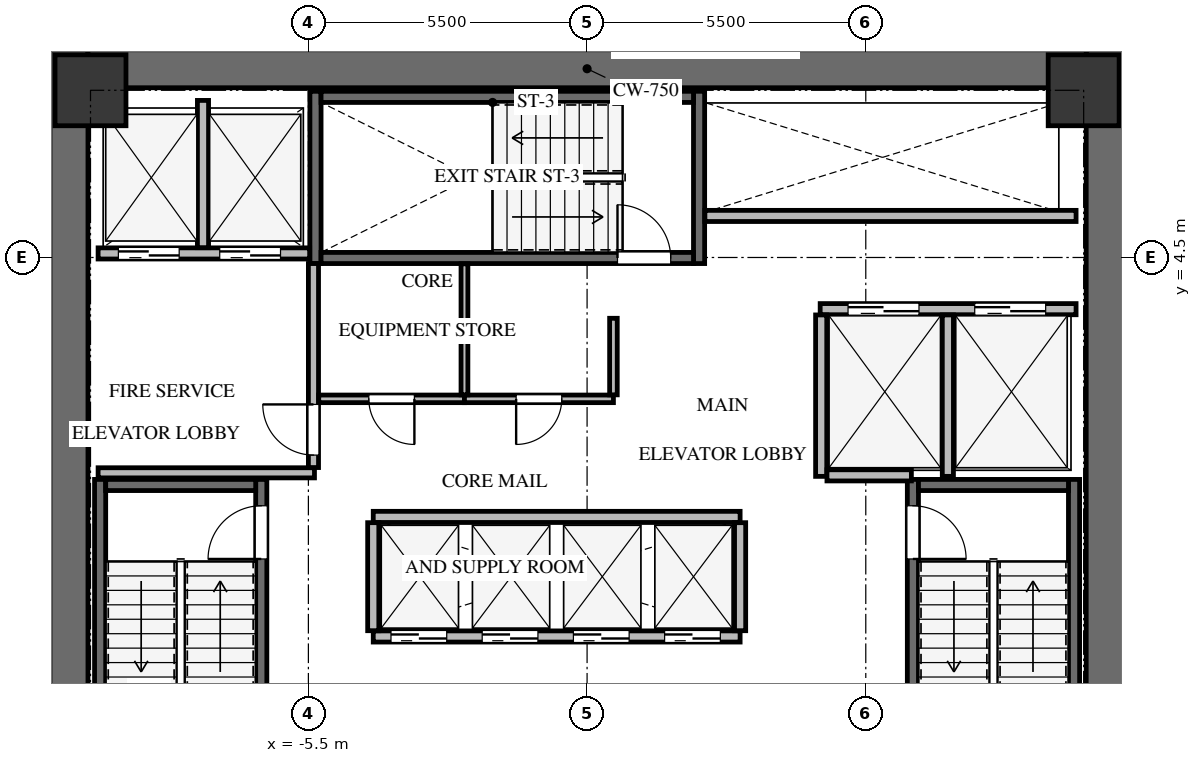
"""IFC4 building model, lengths in metres.
Left out: names, types, materials, properties, quantities, classifications, styles, units other than length and angle.
Written with IfcOpenShell. Run it as: python <this file> out.ifc"""

import sys

from ifc_helpers import new_model, si_unit, direction, frame, frame_2d, origin, origin_2d, place, context, subcontext, project, spatial, rectangle, extrude, source, transform, mapped, element, fill, save


model = new_model("IFC4")
c1 = context("Model", 3, precision=1e-05, world=origin(), true_north=direction((0.0, 1.0)))
c2 = subcontext(c1, "Body", "Model", "MODEL_VIEW")
j1 = project(units=[si_unit("LENGTHUNIT", "METRE"), si_unit("PLANEANGLEUNIT", "RADIAN")], contexts=[c1])
p1 = place(None, origin())
s1 = spatial("IfcSite", under=j1, at=p1, CompositionType="ELEMENT")
p2 = place(p1, origin())
s2 = spatial("IfcBuilding", under=s1, at=p2, CompositionType="ELEMENT")
p3 = place(p2, frame((0.0, 0.0, 104.1)))
s3 = spatial("IfcBuildingStorey", under=s2, at=p3, CompositionType="ELEMENT", Elevation=104.1)
for number, where, z_axis, x_axis in (
    (1, (-10.225, -8.6, 0.0), (0.0, 0.0, 1.0), (0.0, 1.0, 0.0)),
    (2, (10.225, -8.6, 0.0), (0.0, 0.0, 1.0), (0.0, 1.0, 0.0)),
):
    element("IfcWall", number, at=place(p3, frame(where, z_axis=z_axis, x_axis=x_axis)), inside=s3, PredefinedType="SHEAR", context=c2, shape_type="SweptSolid", body=[
        extrude(rectangle(XDim=17.2, YDim=0.75, at=frame_2d((8.6, 0.0))), origin(), (0.0, 0.0, 1.0), 3.3),
    ])
p4 = place(p3, frame((-9.85, 8.225, 0.0), z_axis=(0.0, 0.0, 1.0), x_axis=(1.0, 0.0, 0.0)))
e3 = element("IfcWall", 3, at=p4, inside=s3, PredefinedType="SHEAR", context=c2, shape_type="SweptSolid", body=[
    extrude(rectangle(XDim=19.7, YDim=0.75, at=frame_2d((9.85, 0.0))), origin(), (0.0, 0.0, 1.0), 3.3),
])
p5 = place(p3, frame((-6.43, -7.77, -0.24), z_axis=(0.0, 0.0, 1.0), x_axis=(0.0, 1.0, 0.0)))
e4 = element("IfcWall", 4, at=p5, inside=s3, PredefinedType="SHEAR", context=c2, shape_type="SweptSolid", body=[
    extrude(rectangle(XDim=7.89, YDim=0.22, at=frame_2d((3.945, 0.0))), origin(), (0.0, 0.0, 1.0), 3.3),
])
p6 = place(p5, frame((6.32, 0.0, 0.0)))
e5 = element("IfcOpeningElement", 5, at=p6, cuts=e4, PredefinedType="OPENING", context=c2, shape_type="SweptSolid", body=[
    extrude(rectangle(XDim=1.05, YDim=2.15, at=frame_2d((0.525, 1.075))), frame((0.0, 0.12, 0.0), z_axis=(0.0, -1.0, 0.0), x_axis=(1.0, 0.0, 0.0)), (0.0, 0.0, 1.0), 0.24),
])
p7 = place(p3, frame((-9.61, 0.12, -0.24), z_axis=(0.0, 0.0, 1.0), x_axis=(0.0, -1.0, 0.0)))
e6 = element("IfcWall", 6, at=p7, inside=s3, PredefinedType="SHEAR", context=c2, shape_type="SweptSolid", body=[
    extrude(rectangle(XDim=7.89, YDim=0.22, at=frame_2d((3.945, 0.0))), origin(), (0.0, 0.0, 1.0), 3.3),
])
p8 = place(p3, frame((-6.54, 0.01, -0.24), z_axis=(0.0, 0.0, 1.0), x_axis=(-1.0, 0.0, 0.0)))
e7 = element("IfcWall", 7, at=p8, inside=s3, PredefinedType="SHEAR", context=c2, shape_type="SweptSolid", body=[
    extrude(rectangle(XDim=2.96, YDim=0.22, at=frame_2d((1.48, 0.0))), origin(), (0.0, 0.0, 1.0), 3.3),
])
p9 = place(p3, frame((9.61, -7.77, -0.24), z_axis=(0.0, 0.0, 1.0), x_axis=(0.0, 1.0, 0.0)))
e8 = element("IfcWall", 8, at=p9, inside=s3, PredefinedType="SHEAR", context=c2, shape_type="SweptSolid", body=[
    extrude(rectangle(XDim=7.89, YDim=0.22, at=frame_2d((3.945, 0.0))), origin(), (0.0, 0.0, 1.0), 3.3),
])
p10 = place(p3, frame((6.43, 0.12, -0.24), z_axis=(0.0, 0.0, 1.0), x_axis=(0.0, -1.0, 0.0)))
e9 = element("IfcWall", 9, at=p10, inside=s3, PredefinedType="SHEAR", context=c2, shape_type="SweptSolid", body=[
    extrude(rectangle(XDim=7.89, YDim=0.22, at=frame_2d((3.945, 0.0))), origin(), (0.0, 0.0, 1.0), 3.3),
])
p11 = place(p10, frame((0.52, 0.0, 0.0)))
e10 = element("IfcOpeningElement", 10, at=p11, cuts=e9, PredefinedType="OPENING", context=c2, shape_type="SweptSolid", body=[
    extrude(rectangle(XDim=1.05, YDim=2.15, at=frame_2d((0.525, 1.075))), frame((0.0, 0.12, 0.0), z_axis=(0.0, -1.0, 0.0), x_axis=(1.0, 0.0, 0.0)), (0.0, 0.0, 1.0), 0.24),
])
p12 = place(p3, frame((9.5, 0.01, -0.24), z_axis=(0.0, 0.0, 1.0), x_axis=(-1.0, 0.0, 0.0)))
e11 = element("IfcWall", 11, at=p12, inside=s3, PredefinedType="SHEAR", context=c2, shape_type="SweptSolid", body=[
    extrude(rectangle(XDim=2.96, YDim=0.22, at=frame_2d((1.48, 0.0))), origin(), (0.0, 0.0, 1.0), 3.3),
])
for number, where, z_axis, x_axis in (
    (12, (2.21, 4.38, -0.24), (0.0, 0.0, 1.0), (0.0, 1.0, 0.0)),
    (13, (-5.36, 7.78, -0.24), (0.0, 0.0, 1.0), (0.0, -1.0, 0.0)),
):
    element("IfcWall", number, at=place(p3, frame(where, z_axis=z_axis, x_axis=x_axis)), inside=s3, PredefinedType="SHEAR", context=c2, shape_type="SweptSolid", body=[
        extrude(rectangle(XDim=3.4, YDim=0.22, at=frame_2d((1.7, 0.0))), origin(), (0.0, 0.0, 1.0), 3.3),
    ])
p13 = place(p3, frame((-5.25, 4.49, -0.24), z_axis=(0.0, 0.0, 1.0), x_axis=(1.0, 0.0, 0.0)))
e14 = element("IfcWall", 14, at=p13, inside=s3, PredefinedType="SHEAR", context=c2, shape_type="SweptSolid", body=[
    extrude(rectangle(XDim=7.35, YDim=0.22, at=frame_2d((3.675, 0.0))), origin(), (0.0, 0.0, 1.0), 3.3),
])
p14 = place(p13, frame((5.85, 0.0, 0.0)))
e15 = element("IfcOpeningElement", 15, at=p14, cuts=e14, PredefinedType="OPENING", context=c2, shape_type="SweptSolid", body=[
    extrude(rectangle(XDim=1.05, YDim=2.15, at=frame_2d((0.525, 1.075))), frame((0.0, 0.12, 0.0), z_axis=(0.0, -1.0, 0.0), x_axis=(1.0, 0.0, 0.0)), (0.0, 0.0, 1.0), 0.24),
])
p15 = place(p3, frame((2.1, 7.67, -0.24), z_axis=(0.0, 0.0, 1.0), x_axis=(-1.0, 0.0, 0.0)))
e16 = element("IfcWall", 16, at=p15, inside=s3, PredefinedType="SHEAR", context=c2, shape_type="SweptSolid", body=[
    extrude(rectangle(XDim=7.35, YDim=0.22, at=frame_2d((3.675, 0.0))), origin(), (0.0, 0.0, 1.0), 3.3),
])
m1 = source(origin(), c2, "Body", "SweptSolid", [
    extrude(rectangle(XDim=1.4, YDim=1.4, at=origin_2d()), origin(), (0.0, 0.0, 1.0), 3.3),
])
for number, where, z_axis, x_axis in (
    (17, (9.8, 7.8, -0.24), (0.0, 0.0, 1.0), (1.0, 0.0, 0.0)),
    (18, (-9.8, 7.8, -0.24), (0.0, 0.0, 1.0), (1.0, 0.0, 0.0)),
):
    element("IfcColumn", number, at=place(p3, frame(where, z_axis=z_axis, x_axis=x_axis)), inside=s3, PredefinedType="COLUMN", context=c2, shape_type="MappedRepresentation", body=[
        mapped(m1, transform((0.0, 0.0, 0.0), x_axis=(1.0, 0.0, 0.0), y_axis=(0.0, 1.0, 0.0), z_axis=(0.0, 0.0, 1.0), scale=1.0)),
    ])
p16 = place(p3, frame((-9.65, 4.58, 0.0), z_axis=(0.0, 0.0, 1.0), x_axis=(1.0, 0.0, 0.0)))
e19 = element("IfcWall", 19, at=p16, inside=s3, PredefinedType="SOLIDWALL", context=c2, shape_type="SweptSolid", body=[
    extrude(rectangle(XDim=4.175, YDim=0.22, at=frame_2d((2.087, 0.0))), origin(), (0.0, 0.0, 1.0), 3.045),
])
p17 = place(p16, frame((0.4, 0.0, 0.0)))
e20 = element("IfcOpeningElement", 20, at=p17, cuts=e19, PredefinedType="OPENING", context=c2, shape_type="SweptSolid", body=[
    extrude(rectangle(XDim=1.2, YDim=2.15, at=frame_2d((0.6, 1.075))), frame((0.0, 0.12, 0.0), z_axis=(0.0, -1.0, 0.0), x_axis=(1.0, 0.0, 0.0)), (0.0, 0.0, 1.0), 0.24),
])
p18 = place(p16, frame((2.4, 0.0, 0.0)))
e21 = element("IfcOpeningElement", 21, at=p18, cuts=e19, PredefinedType="OPENING", context=c2, shape_type="SweptSolid", body=[
    extrude(rectangle(XDim=1.2, YDim=2.15, at=frame_2d((0.6, 1.075))), frame((0.0, 0.12, 0.0), z_axis=(0.0, -1.0, 0.0), x_axis=(1.0, 0.0, 0.0)), (0.0, 0.0, 1.0), 0.24),
])
p19 = place(p3, frame((-7.58, 4.694, 0.0), z_axis=(0.0, 0.0, 1.0), x_axis=(0.0, 1.0, 0.0)))
e22 = element("IfcWall", 22, at=p19, inside=s3, PredefinedType="SOLIDWALL", context=c2, shape_type="SweptSolid", body=[
    extrude(rectangle(XDim=2.906, YDim=0.22, at=frame_2d((1.453, 0.0))), origin(), (0.0, 0.0, 1.0), 3.045),
])
p20 = place(p3, frame((-9.65, 0.25, 0.0), z_axis=(0.0, 0.0, 1.0), x_axis=(1.0, 0.0, 0.0)))
e23 = element("IfcWall", 23, at=p20, inside=s3, PredefinedType="SOLIDWALL", context=c2, shape_type="SweptSolid", body=[
    extrude(rectangle(XDim=4.27, YDim=0.2, at=frame_2d((2.135, 0.0))), origin(), (0.0, 0.0, 1.0), 3.045),
])
p21 = place(p3, frame((-5.4, 0.354, 0.0), z_axis=(0.0, 0.0, 1.0), x_axis=(0.0, 1.0, 0.0)))
e24 = element("IfcWall", 24, at=p21, inside=s3, PredefinedType="SOLIDWALL", context=c2, shape_type="SweptSolid", body=[
    extrude(rectangle(XDim=4.026, YDim=0.2, at=frame_2d((2.013, 0.0))), origin(), (0.0, 0.0, 1.0), 3.045),
])
p22 = place(p21, frame((0.246, 0.0, 0.0)))
e25 = element("IfcOpeningElement", 25, at=p22, cuts=e24, PredefinedType="OPENING", context=c2, shape_type="SweptSolid", body=[
    extrude(rectangle(XDim=1.0, YDim=2.15, at=frame_2d((0.5, 1.075))), frame((0.0, 0.11, 0.0), z_axis=(0.0, -1.0, 0.0), x_axis=(1.0, 0.0, 0.0)), (0.0, 0.0, 1.0), 0.22),
])
p23 = place(p3, frame((4.6, 3.48, 0.0), z_axis=(0.0, 0.0, 1.0), x_axis=(1.0, 0.0, 0.0)))
e26 = element("IfcWall", 26, at=p23, inside=s3, PredefinedType="SOLIDWALL", context=c2, shape_type="SweptSolid", body=[
    extrude(rectangle(XDim=5.05, YDim=0.22, at=frame_2d((2.525, 0.0))), origin(), (0.0, 0.0, 1.0), 3.045),
])
p24 = place(p23, frame((0.55, 0.0, 0.0)))
e27 = element("IfcOpeningElement", 27, at=p24, cuts=e26, PredefinedType="OPENING", context=c2, shape_type="SweptSolid", body=[
    extrude(rectangle(XDim=1.4, YDim=2.15, at=frame_2d((0.7, 1.075))), frame((0.0, 0.12, 0.0), z_axis=(0.0, -1.0, 0.0), x_axis=(1.0, 0.0, 0.0)), (0.0, 0.0, 1.0), 0.24),
])
p25 = place(p23, frame((3.05, 0.0, 0.0)))
e28 = element("IfcOpeningElement", 28, at=p25, cuts=e26, PredefinedType="OPENING", context=c2, shape_type="SweptSolid", body=[
    extrude(rectangle(XDim=1.4, YDim=2.15, at=frame_2d((0.7, 1.075))), frame((0.0, 0.12, 0.0), z_axis=(0.0, -1.0, 0.0), x_axis=(1.0, 0.0, 0.0)), (0.0, 0.0, 1.0), 0.24),
])
for number, where, z_axis, x_axis in (
    (29, (4.62, 0.18, 0.0), (0.0, 0.0, 1.0), (0.0, 1.0, 0.0)),
    (30, (7.12, 0.18, 0.0), (0.0, 0.0, 1.0), (0.0, 1.0, 0.0)),
):
    element("IfcWall", number, at=place(p3, frame(where, z_axis=z_axis, x_axis=x_axis)), inside=s3, PredefinedType="SOLIDWALL", context=c2, shape_type="SweptSolid", body=[
        extrude(rectangle(XDim=3.186, YDim=0.22, at=frame_2d((1.593, 0.0))), origin(), (0.0, 0.0, 1.0), 3.045),
    ])
p26 = place(p3, frame((4.734, 0.2, 0.0), z_axis=(0.0, 0.0, 1.0), x_axis=(1.0, 0.0, 0.0)))
e31 = element("IfcWall", 31, at=p26, inside=s3, PredefinedType="SOLIDWALL", context=c2, shape_type="SweptSolid", body=[
    extrude(rectangle(XDim=1.666, YDim=0.22, at=frame_2d((0.833, 0.0))), origin(), (0.0, 0.0, 1.0), 3.045),
])
p27 = place(p3, frame((-4.22, -2.98, 0.0), z_axis=(0.0, 0.0, 1.0), x_axis=(1.0, 0.0, 0.0)))
e32 = element("IfcWall", 32, at=p27, inside=s3, PredefinedType="SOLIDWALL", context=c2, shape_type="SweptSolid", body=[
    extrude(rectangle(XDim=7.24, YDim=0.22, at=frame_2d((3.62, 0.0))), origin(), (0.0, 0.0, 1.0), 3.045),
])
p28 = place(p27, frame((0.35, 0.0, 0.0)))
e33 = element("IfcOpeningElement", 33, at=p28, cuts=e32, PredefinedType="OPENING", context=c2, shape_type="SweptSolid", body=[
    extrude(rectangle(XDim=1.1, YDim=2.15, at=frame_2d((0.55, 1.075))), frame((0.0, 0.12, 0.0), z_axis=(0.0, -1.0, 0.0), x_axis=(1.0, 0.0, 0.0)), (0.0, 0.0, 1.0), 0.24),
])
p29 = place(p27, frame((2.15, 0.0, 0.0)))
e34 = element("IfcOpeningElement", 34, at=p29, cuts=e32, PredefinedType="OPENING", context=c2, shape_type="SweptSolid", body=[
    extrude(rectangle(XDim=1.1, YDim=2.15, at=frame_2d((0.55, 1.075))), frame((0.0, 0.12, 0.0), z_axis=(0.0, -1.0, 0.0), x_axis=(1.0, 0.0, 0.0)), (0.0, 0.0, 1.0), 0.24),
])
p30 = place(p27, frame((3.95, 0.0, 0.0)))
e35 = element("IfcOpeningElement", 35, at=p30, cuts=e32, PredefinedType="OPENING", context=c2, shape_type="SweptSolid", body=[
    extrude(rectangle(XDim=1.1, YDim=2.15, at=frame_2d((0.55, 1.075))), frame((0.0, 0.12, 0.0), z_axis=(0.0, -1.0, 0.0), x_axis=(1.0, 0.0, 0.0)), (0.0, 0.0, 1.0), 0.24),
])
p31 = place(p27, frame((5.75, 0.0, 0.0)))
e36 = element("IfcOpeningElement", 36, at=p31, cuts=e32, PredefinedType="OPENING", context=c2, shape_type="SweptSolid", body=[
    extrude(rectangle(XDim=1.1, YDim=2.15, at=frame_2d((0.55, 1.075))), frame((0.0, 0.12, 0.0), z_axis=(0.0, -1.0, 0.0), x_axis=(1.0, 0.0, 0.0)), (0.0, 0.0, 1.0), 0.24),
])
p32 = place(p3, frame((-4.22, -0.62, 0.0), z_axis=(0.0, 0.0, 1.0), x_axis=(1.0, 0.0, 0.0)))
e37 = element("IfcWall", 37, at=p32, inside=s3, PredefinedType="SOLIDWALL", context=c2, shape_type="SweptSolid", body=[
    extrude(rectangle(XDim=7.24, YDim=0.22, at=frame_2d((3.62, 0.0))), origin(), (0.0, 0.0, 1.0), 3.045),
])
for number, where, z_axis, x_axis in (
    (38, (-4.22, -2.866, 0.0), (0.0, 0.0, 1.0), (0.0, 1.0, 0.0)),
    (39, (3.02, -2.866, 0.0), (0.0, 0.0, 1.0), (0.0, 1.0, 0.0)),
):
    element("IfcWall", number, at=place(p3, frame(where, z_axis=z_axis, x_axis=x_axis)), inside=s3, PredefinedType="SOLIDWALL", context=c2, shape_type="SweptSolid", body=[
        extrude(rectangle(XDim=2.132, YDim=0.22, at=frame_2d((1.066, 0.0))), origin(), (0.0, 0.0, 1.0), 3.045),
    ])
p33 = place(p3, frame((2.325, 5.32, 0.0), z_axis=(0.0, 0.0, 1.0), x_axis=(1.0, 0.0, 0.0)))
e40 = element("IfcWall", 40, at=p33, inside=s3, PredefinedType="SOLIDWALL", context=c2, shape_type="SweptSolid", body=[
    extrude(rectangle(XDim=7.325, YDim=0.22, at=frame_2d((3.663, 0.0))), origin(), (0.0, 0.0, 1.0), 3.045),
])
p34 = place(p3, frame((-2.42, 1.71, 0.0), z_axis=(0.0, 0.0, 1.0), x_axis=(-1.0, 0.0, 0.0)))
e41 = element("IfcWall", 41, at=p34, inside=s3, PredefinedType="PARTITIONING", context=c2, shape_type="SweptSolid", body=[
    extrude(rectangle(XDim=2.876, YDim=0.15, at=frame_2d((1.438, 0.0))), origin(), (0.0, 0.0, 1.0), 3.045),
])
p35 = place(p34, frame((0.988, 0.0, 0.0)))
e42 = element("IfcOpeningElement", 42, at=p35, cuts=e41, PredefinedType="OPENING", context=c2, shape_type="SweptSolid", body=[
    extrude(rectangle(XDim=0.9, YDim=2.05, at=frame_2d((0.45, 1.025))), frame((0.0, 0.085, 0.0), z_axis=(0.0, -1.0, 0.0), x_axis=(1.0, 0.0, 0.0)), (0.0, 0.0, 1.0), 0.17),
])
p36 = place(p3, frame((0.52, 1.71, 0.0), z_axis=(0.0, 0.0, 1.0), x_axis=(-1.0, 0.0, 0.0)))
e43 = element("IfcWall", 43, at=p36, inside=s3, PredefinedType="PARTITIONING", context=c2, shape_type="SweptSolid", body=[
    extrude(rectangle(XDim=2.94, YDim=0.15, at=frame_2d((1.47, 0.0))), origin(), (0.0, 0.0, 1.0), 3.045),
])
p37 = place(p36, frame((1.02, 0.0, 0.0)))
e44 = element("IfcOpeningElement", 44, at=p37, cuts=e43, PredefinedType="OPENING", context=c2, shape_type="SweptSolid", body=[
    extrude(rectangle(XDim=0.9, YDim=2.05, at=frame_2d((0.45, 1.025))), frame((0.0, 0.085, 0.0), z_axis=(0.0, -1.0, 0.0), x_axis=(1.0, 0.0, 0.0)), (0.0, 0.0, 1.0), 0.17),
])
p38 = place(p3, frame((0.52, 3.3, 0.0), z_axis=(0.0, 0.0, 1.0), x_axis=(0.0, -1.0, 0.0)))
e45 = element("IfcWall", 45, at=p38, inside=s3, PredefinedType="PARTITIONING", context=c2, shape_type="SweptSolid", body=[
    extrude(rectangle(XDim=1.511, YDim=0.15, at=frame_2d((0.755, 0.0))), origin(), (0.0, 0.0, 1.0), 3.045),
])
p39 = place(p3, frame((-2.42, 4.375, 0.0), z_axis=(0.0, 0.0, 1.0), x_axis=(0.0, -1.0, 0.0)))
e46 = element("IfcWall", 46, at=p39, inside=s3, PredefinedType="PARTITIONING", context=c2, shape_type="SweptSolid", body=[
    extrude(rectangle(XDim=2.586, YDim=0.135, at=frame_2d((1.293, 0.0))), origin(), (0.0, 0.0, 1.0), 3.045),
])
m2 = source(origin(), c2, "Body", "SweptSolid", [
    extrude(rectangle(XDim=1.05, YDim=2.15, at=frame_2d((0.525, 1.075))), frame((0.0, 0.025, 0.0), z_axis=(0.0, -1.0, 0.0), x_axis=(1.0, 0.0, 0.0)), (0.0, 0.0, 1.0), 0.05),
])
p40 = place(p6, origin())
e47 = element("IfcDoor", 47, at=p40, inside=s3, OperationType="SINGLE_SWING_LEFT", PredefinedType="DOOR", context=c2, shape_type="MappedRepresentation", body=[
    mapped(m2, transform((0.0, 0.0, 0.0), x_axis=(1.0, 0.0, 0.0), y_axis=(0.0, 1.0, 0.0), z_axis=(0.0, 0.0, 1.0), scale=1.0)),
])
fill(e5, e47)
m3 = source(origin(), c2, "Body", "SweptSolid", [
    extrude(rectangle(XDim=1.05, YDim=2.15, at=frame_2d((0.525, 1.075))), frame((0.0, 0.025, 0.0), z_axis=(0.0, -1.0, 0.0), x_axis=(1.0, 0.0, 0.0)), (0.0, 0.0, 1.0), 0.05),
])
p41 = place(p11, origin())
e48 = element("IfcDoor", 48, at=p41, inside=s3, OperationType="SINGLE_SWING_RIGHT", PredefinedType="DOOR", context=c2, shape_type="MappedRepresentation", body=[
    mapped(m3, transform((0.0, 0.0, 0.0), x_axis=(1.0, 0.0, 0.0), y_axis=(0.0, 1.0, 0.0), z_axis=(0.0, 0.0, 1.0), scale=1.0)),
])
fill(e10, e48)
p42 = place(p14, origin())
e49 = element("IfcDoor", 49, at=p42, inside=s3, OperationType="SINGLE_SWING_LEFT", PredefinedType="DOOR", context=c2, shape_type="MappedRepresentation", body=[
    mapped(m2, transform((0.0, 0.0, 0.0), x_axis=(1.0, 0.0, 0.0), y_axis=(0.0, 1.0, 0.0), z_axis=(0.0, 0.0, 1.0), scale=1.0)),
])
fill(e15, e49)
m4 = source(origin(), c2, "Body", "SweptSolid", [
    extrude(rectangle(XDim=1.2, YDim=2.15, at=frame_2d((0.6, 1.075))), frame((0.0, 0.025, 0.0), z_axis=(0.0, -1.0, 0.0), x_axis=(1.0, 0.0, 0.0)), (0.0, 0.0, 1.0), 0.05),
])
p43 = place(p17, origin())
e50 = element("IfcDoor", 50, at=p43, inside=s3, OperationType="DOUBLE_DOOR_SLIDING", PredefinedType="DOOR", context=c2, shape_type="MappedRepresentation", body=[
    mapped(m4, transform((0.0, 0.0, 0.0), x_axis=(1.0, 0.0, 0.0), y_axis=(0.0, 1.0, 0.0), z_axis=(0.0, 0.0, 1.0), scale=1.0)),
])
fill(e20, e50)
p44 = place(p18, origin())
e51 = element("IfcDoor", 51, at=p44, inside=s3, OperationType="DOUBLE_DOOR_SLIDING", PredefinedType="DOOR", context=c2, shape_type="MappedRepresentation", body=[
    mapped(m4, transform((0.0, 0.0, 0.0), x_axis=(1.0, 0.0, 0.0), y_axis=(0.0, 1.0, 0.0), z_axis=(0.0, 0.0, 1.0), scale=1.0)),
])
fill(e21, e51)
m5 = source(origin(), c2, "Body", "SweptSolid", [
    extrude(rectangle(XDim=1.0, YDim=2.15, at=frame_2d((0.5, 1.075))), frame((0.0, 0.025, 0.0), z_axis=(0.0, -1.0, 0.0), x_axis=(1.0, 0.0, 0.0)), (0.0, 0.0, 1.0), 0.05),
])
p45 = place(p22, origin())
e52 = element("IfcDoor", 52, at=p45, inside=s3, OperationType="SINGLE_SWING_RIGHT", PredefinedType="DOOR", context=c2, shape_type="MappedRepresentation", body=[
    mapped(m5, transform((0.0, 0.0, 0.0), x_axis=(1.0, 0.0, 0.0), y_axis=(0.0, 1.0, 0.0), z_axis=(0.0, 0.0, 1.0), scale=1.0)),
])
fill(e25, e52)
m6 = source(origin(), c2, "Body", "SweptSolid", [
    extrude(rectangle(XDim=1.4, YDim=2.15, at=frame_2d((0.7, 1.075))), frame((0.0, 0.025, 0.0), z_axis=(0.0, -1.0, 0.0), x_axis=(1.0, 0.0, 0.0)), (0.0, 0.0, 1.0), 0.05),
])
p46 = place(p24, origin())
e53 = element("IfcDoor", 53, at=p46, inside=s3, OperationType="DOUBLE_DOOR_SLIDING", PredefinedType="DOOR", context=c2, shape_type="MappedRepresentation", body=[
    mapped(m6, transform((0.0, 0.0, 0.0), x_axis=(1.0, 0.0, 0.0), y_axis=(0.0, 1.0, 0.0), z_axis=(0.0, 0.0, 1.0), scale=1.0)),
])
fill(e27, e53)
p47 = place(p25, origin())
e54 = element("IfcDoor", 54, at=p47, inside=s3, OperationType="DOUBLE_DOOR_SLIDING", PredefinedType="DOOR", context=c2, shape_type="MappedRepresentation", body=[
    mapped(m6, transform((0.0, 0.0, 0.0), x_axis=(1.0, 0.0, 0.0), y_axis=(0.0, 1.0, 0.0), z_axis=(0.0, 0.0, 1.0), scale=1.0)),
])
fill(e28, e54)
m7 = source(origin(), c2, "Body", "SweptSolid", [
    extrude(rectangle(XDim=1.1, YDim=2.15, at=frame_2d((0.55, 1.075))), frame((0.0, 0.025, 0.0), z_axis=(0.0, -1.0, 0.0), x_axis=(1.0, 0.0, 0.0)), (0.0, 0.0, 1.0), 0.05),
])
p48 = place(p28, origin())
e55 = element("IfcDoor", 55, at=p48, inside=s3, OperationType="DOUBLE_DOOR_SLIDING", PredefinedType="DOOR", context=c2, shape_type="MappedRepresentation", body=[
    mapped(m7, transform((0.0, 0.0, 0.0), x_axis=(1.0, 0.0, 0.0), y_axis=(0.0, 1.0, 0.0), z_axis=(0.0, 0.0, 1.0), scale=1.0)),
])
fill(e33, e55)
p49 = place(p29, origin())
e56 = element("IfcDoor", 56, at=p49, inside=s3, OperationType="DOUBLE_DOOR_SLIDING", PredefinedType="DOOR", context=c2, shape_type="MappedRepresentation", body=[
    mapped(m7, transform((0.0, 0.0, 0.0), x_axis=(1.0, 0.0, 0.0), y_axis=(0.0, 1.0, 0.0), z_axis=(0.0, 0.0, 1.0), scale=1.0)),
])
fill(e34, e56)
p50 = place(p30, origin())
e57 = element("IfcDoor", 57, at=p50, inside=s3, OperationType="DOUBLE_DOOR_SLIDING", PredefinedType="DOOR", context=c2, shape_type="MappedRepresentation", body=[
    mapped(m7, transform((0.0, 0.0, 0.0), x_axis=(1.0, 0.0, 0.0), y_axis=(0.0, 1.0, 0.0), z_axis=(0.0, 0.0, 1.0), scale=1.0)),
])
fill(e35, e57)
p51 = place(p31, origin())
e58 = element("IfcDoor", 58, at=p51, inside=s3, OperationType="DOUBLE_DOOR_SLIDING", PredefinedType="DOOR", context=c2, shape_type="MappedRepresentation", body=[
    mapped(m7, transform((0.0, 0.0, 0.0), x_axis=(1.0, 0.0, 0.0), y_axis=(0.0, 1.0, 0.0), z_axis=(0.0, 0.0, 1.0), scale=1.0)),
])
fill(e36, e58)
m8 = source(origin(), c2, "Body", "SweptSolid", [
    extrude(rectangle(XDim=0.9, YDim=2.05, at=frame_2d((0.45, 1.025))), frame((0.0, 0.025, 0.0), z_axis=(0.0, -1.0, 0.0), x_axis=(1.0, 0.0, 0.0)), (0.0, 0.0, 1.0), 0.05),
])
p52 = place(p35, origin())
e59 = element("IfcDoor", 59, at=p52, inside=s3, OperationType="SINGLE_SWING_LEFT", PredefinedType="DOOR", context=c2, shape_type="MappedRepresentation", body=[
    mapped(m8, transform((0.0, 0.0, 0.0), x_axis=(1.0, 0.0, 0.0), y_axis=(0.0, 1.0, 0.0), z_axis=(0.0, 0.0, 1.0), scale=1.0)),
])
fill(e42, e59)
m9 = source(origin(), c2, "Body", "SweptSolid", [
    extrude(rectangle(XDim=0.9, YDim=2.05, at=frame_2d((0.45, 1.025))), frame((0.0, 0.025, 0.0), z_axis=(0.0, -1.0, 0.0), x_axis=(1.0, 0.0, 0.0)), (0.0, 0.0, 1.0), 0.05),
])
p53 = place(p37, origin())
e60 = element("IfcDoor", 60, at=p53, inside=s3, OperationType="SINGLE_SWING_RIGHT", PredefinedType="DOOR", context=c2, shape_type="MappedRepresentation", body=[
    mapped(m9, transform((0.0, 0.0, 0.0), x_axis=(1.0, 0.0, 0.0), y_axis=(0.0, 1.0, 0.0), z_axis=(0.0, 0.0, 1.0), scale=1.0)),
])
fill(e44, e60)
save(model, sys.argv[1])
